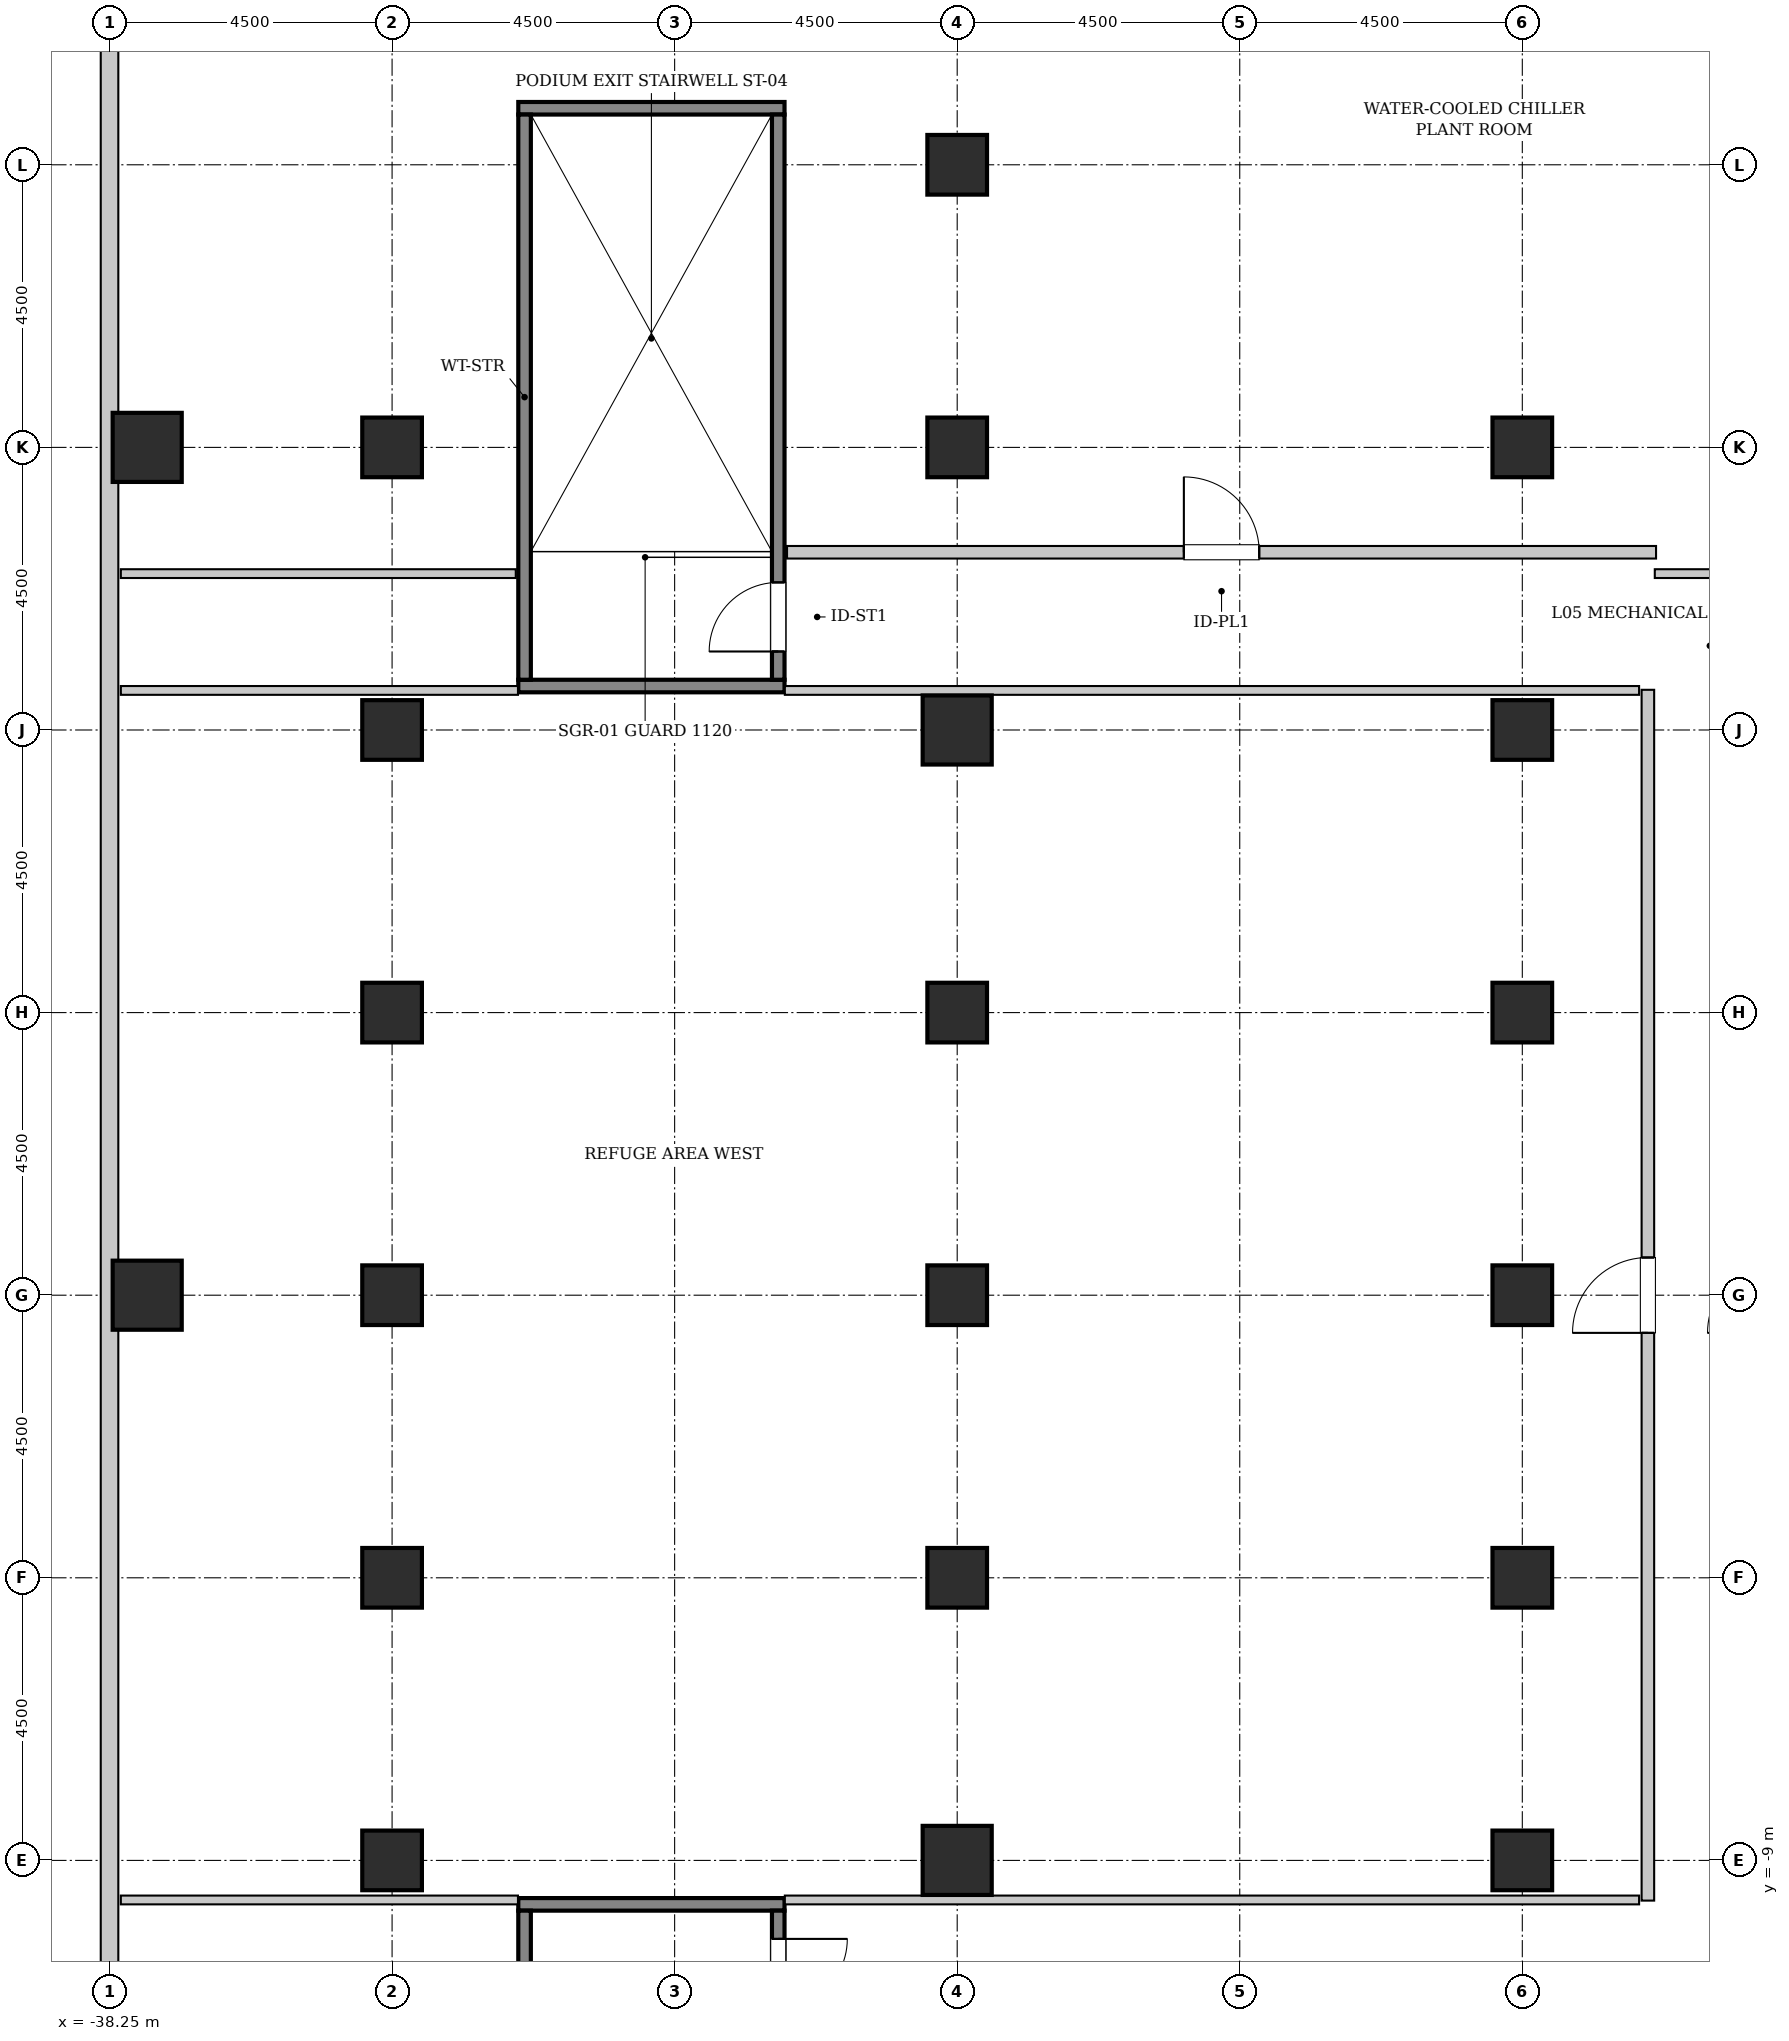
"""IFC4 building model, lengths in metres.
Left out: names, types, materials, properties, quantities, classifications, styles, units other than length and angle.
Written with IfcOpenShell. Run it as: python <this file> out.ifc"""

import sys

from ifc_helpers import new_model, si_unit, direction, frame, frame_2d, origin, origin_2d, place, context, subcontext, project, spatial, rectangle, hollow_rectangle, extrude, source, transform, mapped, element, fill, save


model = new_model("IFC4")
c1 = context("Model", 3, precision=1e-05, world=origin(), true_north=direction((0.0, 1.0)))
c2 = subcontext(c1, "Body", "Model", "MODEL_VIEW")
j1 = project(units=[si_unit("LENGTHUNIT", "METRE"), si_unit("PLANEANGLEUNIT", "RADIAN")], contexts=[c1])
p1 = place(None, origin())
s1 = spatial("IfcSite", under=j1, at=p1, CompositionType="ELEMENT")
p2 = place(p1, origin())
s2 = spatial("IfcBuilding", under=s1, at=p2, CompositionType="ELEMENT")
p3 = place(p2, frame((0.0, 0.0, 27.6)))
s3 = spatial("IfcBuildingStorey", under=s2, at=p3, CompositionType="ELEMENT", Elevation=27.6)
m1 = source(origin(), c2, "Body", "SweptSolid", [
    extrude(hollow_rectangle(XDim=1.1, YDim=1.1, WallThickness=0.055, InnerFilletRadius=0.055, OuterFilletRadius=0.11, at=origin_2d()), origin(), (0.0, 0.0, 1.0), 5.4),
])
for number, where, z_axis, x_axis in (
    (1, (-37.65, 0.0, 0.0), (0.0, 0.0, 1.0), (1.0, 0.0, 0.0)),
    (2, (-37.65, 13.5, 0.0), (0.0, 0.0, 1.0), (1.0, 0.0, 0.0)),
):
    element("IfcColumn", number, at=place(p3, frame(where, z_axis=z_axis, x_axis=x_axis)), inside=s3, PredefinedType="COLUMN", context=c2, shape_type="MappedRepresentation", body=[
        mapped(m1, transform((0.0, 0.0, 0.0), x_axis=(1.0, 0.0, 0.0), y_axis=(0.0, 1.0, 0.0), z_axis=(0.0, 0.0, 1.0), scale=1.0)),
    ])
m2 = source(origin(), c2, "Body", "SweptSolid", [
    extrude(hollow_rectangle(XDim=1.1, YDim=1.1, WallThickness=0.055, InnerFilletRadius=0.055, OuterFilletRadius=0.11, at=origin_2d()), origin(), (0.0, 0.0, 1.0), 5.4),
])
for number, where, z_axis, x_axis in (
    (3, (-24.75, -9.0, 0.0), (0.0, 0.0, 1.0), (1.0, 0.0, 0.0)),
    (4, (-24.75, 9.0, 0.0), (0.0, 0.0, 1.0), (1.0, 0.0, 0.0)),
):
    element("IfcColumn", number, at=place(p3, frame(where, z_axis=z_axis, x_axis=x_axis)), inside=s3, PredefinedType="COLUMN", context=c2, shape_type="MappedRepresentation", body=[
        mapped(m2, transform((0.0, 0.0, 0.0), x_axis=(1.0, 0.0, 0.0), y_axis=(0.0, 1.0, 0.0), z_axis=(0.0, 0.0, 1.0), scale=1.0)),
    ])
m3 = source(origin(), c2, "Body", "SweptSolid", [
    extrude(hollow_rectangle(XDim=0.95, YDim=0.95, WallThickness=0.045, InnerFilletRadius=0.045, OuterFilletRadius=0.09, at=origin_2d()), origin(), (0.0, 0.0, 1.0), 5.4),
])
for number, where, z_axis, x_axis in (
    (5, (-33.75, -9.0, 0.0), (0.0, 0.0, 1.0), (1.0, 0.0, 0.0)),
    (6, (-33.75, -4.5, 0.0), (0.0, 0.0, 1.0), (1.0, 0.0, 0.0)),
    (7, (-33.75, 0.0, 0.0), (0.0, 0.0, 1.0), (1.0, 0.0, 0.0)),
    (8, (-33.75, 4.5, 0.0), (0.0, 0.0, 1.0), (1.0, 0.0, 0.0)),
    (9, (-33.75, 9.0, 0.0), (0.0, 0.0, 1.0), (1.0, 0.0, 0.0)),
    (10, (-33.75, 13.5, 0.0), (0.0, 0.0, 1.0), (1.0, 0.0, 0.0)),
    (11, (-24.75, -4.5, 0.0), (0.0, 0.0, 1.0), (1.0, 0.0, 0.0)),
    (12, (-24.75, 0.0, 0.0), (0.0, 0.0, 1.0), (1.0, 0.0, 0.0)),
    (13, (-24.75, 4.5, 0.0), (0.0, 0.0, 1.0), (1.0, 0.0, 0.0)),
    (14, (-24.75, 13.5, 0.0), (0.0, 0.0, 1.0), (1.0, 0.0, 0.0)),
    (15, (-24.75, 18.0, 0.0), (0.0, 0.0, 1.0), (1.0, 0.0, 0.0)),
    (16, (-15.75, -9.0, 0.0), (0.0, 0.0, 1.0), (1.0, 0.0, 0.0)),
    (17, (-15.75, -4.5, 0.0), (0.0, 0.0, 1.0), (1.0, 0.0, 0.0)),
    (18, (-15.75, 0.0, 0.0), (0.0, 0.0, 1.0), (1.0, 0.0, 0.0)),
    (19, (-15.75, 4.5, 0.0), (0.0, 0.0, 1.0), (1.0, 0.0, 0.0)),
    (20, (-15.75, 9.0, 0.0), (0.0, 0.0, 1.0), (1.0, 0.0, 0.0)),
    (21, (-15.75, 13.5, 0.0), (0.0, 0.0, 1.0), (1.0, 0.0, 0.0)),
):
    element("IfcColumn", number, at=place(p3, frame(where, z_axis=z_axis, x_axis=x_axis)), inside=s3, PredefinedType="COLUMN", context=c2, shape_type="MappedRepresentation", body=[
        mapped(m3, transform((0.0, 0.0, 0.0), x_axis=(1.0, 0.0, 0.0), y_axis=(0.0, 1.0, 0.0), z_axis=(0.0, 0.0, 1.0), scale=1.0)),
    ])
m4 = source(origin(), c2, "Body", "SweptSolid", [
    extrude(rectangle(XDim=50.4, YDim=0.28, at=frame_2d((25.2, 0.0))), origin(), (0.0, 0.0, 1.0), 5.15),
])
p4 = place(p3, frame((-38.25, 25.2, 0.0), z_axis=(0.0, 0.0, 1.0), x_axis=(0.0, -1.0, 0.0)))
e22 = element("IfcWall", 22, at=p4, inside=s3, PredefinedType="SOLIDWALL", context=c2, shape_type="MappedRepresentation", body=[
    mapped(m4, transform((0.0, 0.0, 0.0), x_axis=(1.0, 0.0, 0.0), y_axis=(0.0, 1.0, 0.0), z_axis=(0.0, 0.0, 1.0), scale=1.0)),
])
m5 = source(origin(), c2, "Body", "SweptSolid", [
    extrude(rectangle(XDim=4.24, YDim=0.2, at=frame_2d((2.12, 0.0))), origin(), (0.0, 0.0, 1.0), 5.15),
])
for number, where, z_axis, x_axis in (
    (23, (-27.5, 9.7, 0.0), (0.0, 0.0, 1.0), (-1.0, 0.0, 0.0)),
    (24, (-27.5, 18.9, 0.0), (0.0, 0.0, 1.0), (-1.0, 0.0, 0.0)),
):
    element("IfcWall", number, at=place(p3, frame(where, z_axis=z_axis, x_axis=x_axis)), inside=s3, PredefinedType="SOLIDWALL", context=c2, shape_type="MappedRepresentation", body=[
        mapped(m5, transform((0.0, 0.0, 0.0), x_axis=(1.0, 0.0, 0.0), y_axis=(0.0, 1.0, 0.0), z_axis=(0.0, 0.0, 1.0), scale=1.0)),
    ])
m6 = source(origin(), c2, "Body", "SweptSolid", [
    extrude(rectangle(XDim=9.0, YDim=0.2, at=frame_2d((4.5, 0.0))), origin(), (0.0, 0.0, 1.0), 5.15),
])
p5 = place(p3, frame((-27.6, 9.8, 0.0), z_axis=(0.0, 0.0, 1.0), x_axis=(0.0, 1.0, 0.0)))
e25 = element("IfcWall", 25, at=p5, inside=s3, PredefinedType="SOLIDWALL", context=c2, shape_type="MappedRepresentation", body=[
    mapped(m6, transform((0.0, 0.0, 0.0), x_axis=(1.0, 0.0, 0.0), y_axis=(0.0, 1.0, 0.0), z_axis=(0.0, 0.0, 1.0), scale=1.0)),
])
p6 = place(p5, frame((0.45, 0.0, 0.0)))
e26 = element("IfcOpeningElement", 26, at=p6, cuts=e25, PredefinedType="OPENING", context=c2, shape_type="SweptSolid", body=[
    extrude(rectangle(XDim=1.1, YDim=2.15, at=frame_2d((0.55, 1.075))), frame((0.0, 0.11, 0.0), z_axis=(0.0, -1.0, 0.0), x_axis=(1.0, 0.0, 0.0)), (0.0, 0.0, 1.0), 0.22),
])
p7 = place(p3, frame((-31.64, 9.8, 0.0), z_axis=(0.0, 0.0, 1.0), x_axis=(0.0, 1.0, 0.0)))
e27 = element("IfcWall", 27, at=p7, inside=s3, PredefinedType="SOLIDWALL", context=c2, shape_type="MappedRepresentation", body=[
    mapped(m6, transform((0.0, 0.0, 0.0), x_axis=(1.0, 0.0, 0.0), y_axis=(0.0, 1.0, 0.0), z_axis=(0.0, 0.0, 1.0), scale=1.0)),
])
p8 = place(p3, frame((-31.74, -9.7, 0.0), z_axis=(0.0, 0.0, 1.0), x_axis=(1.0, 0.0, 0.0)))
e28 = element("IfcWall", 28, at=p8, inside=s3, PredefinedType="SOLIDWALL", context=c2, shape_type="MappedRepresentation", body=[
    mapped(m5, transform((0.0, 0.0, 0.0), x_axis=(1.0, 0.0, 0.0), y_axis=(0.0, 1.0, 0.0), z_axis=(0.0, 0.0, 1.0), scale=1.0)),
])
p9 = place(p3, frame((-31.64, -9.8, 0.0), z_axis=(0.0, 0.0, 1.0), x_axis=(0.0, -1.0, 0.0)))
e29 = element("IfcWall", 29, at=p9, inside=s3, PredefinedType="SOLIDWALL", context=c2, shape_type="MappedRepresentation", body=[
    mapped(m6, transform((0.0, 0.0, 0.0), x_axis=(1.0, 0.0, 0.0), y_axis=(0.0, 1.0, 0.0), z_axis=(0.0, 0.0, 1.0), scale=1.0)),
])
p10 = place(p3, frame((-27.6, -9.8, 0.0), z_axis=(0.0, 0.0, 1.0), x_axis=(0.0, -1.0, 0.0)))
e30 = element("IfcWall", 30, at=p10, inside=s3, PredefinedType="SOLIDWALL", context=c2, shape_type="MappedRepresentation", body=[
    mapped(m6, transform((0.0, 0.0, 0.0), x_axis=(1.0, 0.0, 0.0), y_axis=(0.0, 1.0, 0.0), z_axis=(0.0, 0.0, 1.0), scale=1.0)),
])
p11 = place(p10, frame((0.45, 0.0, 0.0)))
e31 = element("IfcOpeningElement", 31, at=p11, cuts=e30, PredefinedType="OPENING", context=c2, shape_type="SweptSolid", body=[
    extrude(rectangle(XDim=1.1, YDim=2.15, at=frame_2d((0.55, 1.075))), frame((0.0, 0.11, 0.0), z_axis=(0.0, -1.0, 0.0), x_axis=(1.0, 0.0, 0.0)), (0.0, 0.0, 1.0), 0.22),
])
m7 = source(origin(), c2, "Body", "SweptSolid", [
    extrude(rectangle(XDim=19.28, YDim=0.2, at=frame_2d((9.64, 0.0))), origin(), (0.0, 0.0, 1.0), 5.135),
])
p12 = place(p3, frame((-13.75, -9.64, 0.0), z_axis=(0.0, 0.0, 1.0), x_axis=(0.0, 1.0, 0.0)))
e32 = element("IfcWall", 32, at=p12, inside=s3, PredefinedType="SOLIDWALL", context=c2, shape_type="MappedRepresentation", body=[
    mapped(m7, transform((0.0, 0.0, 0.0), x_axis=(1.0, 0.0, 0.0), y_axis=(0.0, 1.0, 0.0), z_axis=(0.0, 0.0, 1.0), scale=1.0)),
])
p13 = place(p12, frame((9.04, 0.0, 0.0)))
e33 = element("IfcOpeningElement", 33, at=p13, cuts=e32, PredefinedType="OPENING", context=c2, shape_type="SweptSolid", body=[
    extrude(rectangle(XDim=1.2, YDim=2.15, at=frame_2d((0.6, 1.075))), frame((0.0, 0.11, 0.0), z_axis=(0.0, -1.0, 0.0), x_axis=(1.0, 0.0, 0.0)), (0.0, 0.0, 1.0), 0.22),
])
m8 = source(origin(), c2, "Body", "SweptSolid", [
    extrude(rectangle(XDim=6.325, YDim=0.14, at=frame_2d((3.163, 0.0))), origin(), (0.0, 0.0, 1.0), 5.135),
])
p14 = place(p3, frame((-38.07, -9.63, 0.0), z_axis=(0.0, 0.0, 1.0), x_axis=(1.0, 0.0, 0.0)))
e34 = element("IfcWall", 34, at=p14, inside=s3, PredefinedType="PARTITIONING", context=c2, shape_type="MappedRepresentation", body=[
    mapped(m8, transform((0.0, 0.0, 0.0), x_axis=(1.0, 0.0, 0.0), y_axis=(0.0, 1.0, 0.0), z_axis=(0.0, 0.0, 1.0), scale=1.0)),
])
m9 = source(origin(), c2, "Body", "SweptSolid", [
    extrude(rectangle(XDim=13.605, YDim=0.14, at=frame_2d((6.803, 0.0))), origin(), (0.0, 0.0, 1.0), 5.135),
])
p15 = place(p3, frame((-27.495, -9.63, 0.0), z_axis=(0.0, 0.0, 1.0), x_axis=(1.0, 0.0, 0.0)))
e35 = element("IfcWall", 35, at=p15, inside=s3, PredefinedType="PARTITIONING", context=c2, shape_type="MappedRepresentation", body=[
    mapped(m9, transform((0.0, 0.0, 0.0), x_axis=(1.0, 0.0, 0.0), y_axis=(0.0, 1.0, 0.0), z_axis=(0.0, 0.0, 1.0), scale=1.0)),
])
p16 = place(p3, frame((-38.07, 9.63, 0.0), z_axis=(0.0, 0.0, 1.0), x_axis=(1.0, 0.0, 0.0)))
e36 = element("IfcWall", 36, at=p16, inside=s3, PredefinedType="PARTITIONING", context=c2, shape_type="MappedRepresentation", body=[
    mapped(m8, transform((0.0, 0.0, 0.0), x_axis=(1.0, 0.0, 0.0), y_axis=(0.0, 1.0, 0.0), z_axis=(0.0, 0.0, 1.0), scale=1.0)),
])
p17 = place(p3, frame((-27.495, 9.63, 0.0), z_axis=(0.0, 0.0, 1.0), x_axis=(1.0, 0.0, 0.0)))
e37 = element("IfcWall", 37, at=p17, inside=s3, PredefinedType="PARTITIONING", context=c2, shape_type="MappedRepresentation", body=[
    mapped(m9, transform((0.0, 0.0, 0.0), x_axis=(1.0, 0.0, 0.0), y_axis=(0.0, 1.0, 0.0), z_axis=(0.0, 0.0, 1.0), scale=1.0)),
])
m10 = source(origin(), c2, "Body", "SweptSolid", [
    extrude(rectangle(XDim=13.84, YDim=0.2, at=frame_2d((6.92, 0.0))), origin(), (0.0, 0.0, 1.0), 5.135),
])
p18 = place(p3, frame((-27.46, 11.83, 0.0), z_axis=(0.0, 0.0, 1.0), x_axis=(1.0, 0.0, 0.0)))
e38 = element("IfcWall", 38, at=p18, inside=s3, PredefinedType="SOLIDWALL", context=c2, shape_type="MappedRepresentation", body=[
    mapped(m10, transform((0.0, 0.0, 0.0), x_axis=(1.0, 0.0, 0.0), y_axis=(0.0, 1.0, 0.0), z_axis=(0.0, 0.0, 1.0), scale=1.0)),
])
p19 = place(p18, frame((6.32, 0.0, 0.0)))
e39 = element("IfcOpeningElement", 39, at=p19, cuts=e38, PredefinedType="OPENING", context=c2, shape_type="SweptSolid", body=[
    extrude(rectangle(XDim=1.2, YDim=2.15, at=frame_2d((0.6, 1.075))), frame((0.0, 0.11, 0.0), z_axis=(0.0, -1.0, 0.0), x_axis=(1.0, 0.0, 0.0)), (0.0, 0.0, 1.0), 0.22),
])
m11 = source(origin(), c2, "Body", "SweptSolid", [
    extrude(rectangle(XDim=4.16, YDim=0.14, at=frame_2d((2.08, 0.0))), origin(), (0.0, 0.0, 1.0), 5.135),
])
p20 = place(p3, frame((-13.64, 11.49, 0.0), z_axis=(0.0, 0.0, 1.0), x_axis=(1.0, 0.0, 0.0)))
e40 = element("IfcWall", 40, at=p20, inside=s3, PredefinedType="PARTITIONING", context=c2, shape_type="MappedRepresentation", body=[
    mapped(m11, transform((0.0, 0.0, 0.0), x_axis=(1.0, 0.0, 0.0), y_axis=(0.0, 1.0, 0.0), z_axis=(0.0, 0.0, 1.0), scale=1.0)),
])
m12 = source(origin(), c2, "Body", "SweptSolid", [
    extrude(rectangle(XDim=6.29, YDim=0.14, at=frame_2d((3.145, 0.0))), origin(), (0.0, 0.0, 1.0), 5.135),
])
p21 = place(p3, frame((-38.07, 11.49, 0.0), z_axis=(0.0, 0.0, 1.0), x_axis=(1.0, 0.0, 0.0)))
e41 = element("IfcWall", 41, at=p21, inside=s3, PredefinedType="PARTITIONING", context=c2, shape_type="MappedRepresentation", body=[
    mapped(m12, transform((0.0, 0.0, 0.0), x_axis=(1.0, 0.0, 0.0), y_axis=(0.0, 1.0, 0.0), z_axis=(0.0, 0.0, 1.0), scale=1.0)),
])
m13 = source(origin(), c2, "Body", "SweptSolid", [
    extrude(rectangle(XDim=1.1, YDim=2.15, at=frame_2d((0.55, 1.075))), frame((0.0, 0.025, 0.0), z_axis=(0.0, -1.0, 0.0), x_axis=(1.0, 0.0, 0.0)), (0.0, 0.0, 1.0), 0.05),
])
p22 = place(p6, origin())
e42 = element("IfcDoor", 42, at=p22, inside=s3, OperationType="SINGLE_SWING_LEFT", PredefinedType="DOOR", context=c2, shape_type="MappedRepresentation", body=[
    mapped(m13, transform((0.0, 0.0, 0.0), x_axis=(1.0, 0.0, 0.0), y_axis=(0.0, 1.0, 0.0), z_axis=(0.0, 0.0, 1.0), scale=1.0)),
])
fill(e26, e42)
p23 = place(p11, origin())
e43 = element("IfcDoor", 43, at=p23, inside=s3, OperationType="SINGLE_SWING_LEFT", PredefinedType="DOOR", context=c2, shape_type="MappedRepresentation", body=[
    mapped(m13, transform((0.0, 0.0, 0.0), x_axis=(1.0, 0.0, 0.0), y_axis=(0.0, 1.0, 0.0), z_axis=(0.0, 0.0, 1.0), scale=1.0)),
])
fill(e31, e43)
m14 = source(origin(), c2, "Body", "SweptSolid", [
    extrude(rectangle(XDim=1.2, YDim=2.15, at=frame_2d((0.6, 1.075))), frame((0.0, 0.025, 0.0), z_axis=(0.0, -1.0, 0.0), x_axis=(1.0, 0.0, 0.0)), (0.0, 0.0, 1.0), 0.05),
])
p24 = place(p13, origin())
e44 = element("IfcDoor", 44, at=p24, inside=s3, OperationType="SINGLE_SWING_LEFT", PredefinedType="DOOR", context=c2, shape_type="MappedRepresentation", body=[
    mapped(m14, transform((0.0, 0.0, 0.0), x_axis=(1.0, 0.0, 0.0), y_axis=(0.0, 1.0, 0.0), z_axis=(0.0, 0.0, 1.0), scale=1.0)),
])
fill(e33, e44)
p25 = place(p19, origin())
e45 = element("IfcDoor", 45, at=p25, inside=s3, OperationType="SINGLE_SWING_LEFT", PredefinedType="DOOR", context=c2, shape_type="MappedRepresentation", body=[
    mapped(m14, transform((0.0, 0.0, 0.0), x_axis=(1.0, 0.0, 0.0), y_axis=(0.0, 1.0, 0.0), z_axis=(0.0, 0.0, 1.0), scale=1.0)),
])
fill(e39, e45)
save(model, sys.argv[1])
